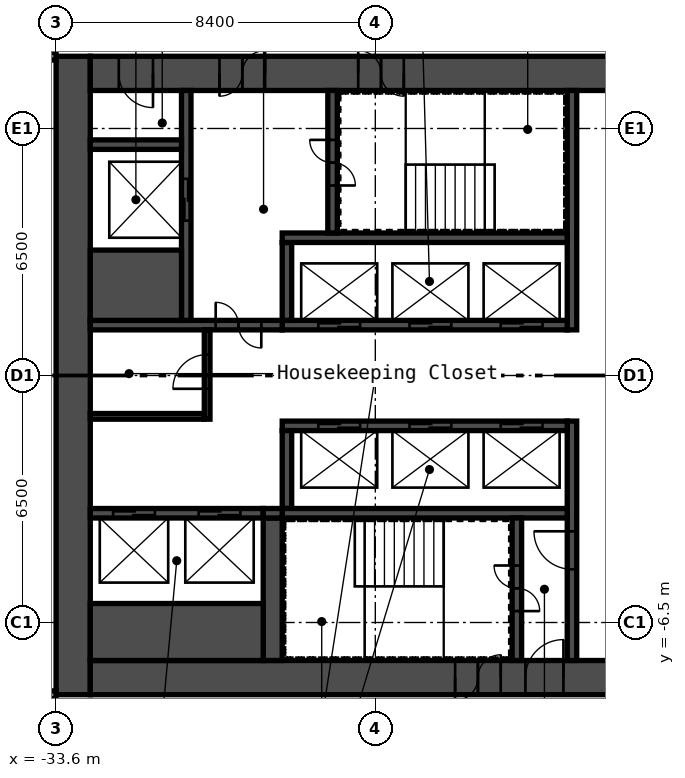
"""IFC4 building model, lengths in metres.
Left out: names, types, materials, properties, quantities, classifications, styles, units other than length and angle.
Written with IfcOpenShell. Run it as: python <this file> out.ifc"""

import sys

from ifc_helpers import new_model, si_unit, direction, frame, frame_2d, origin, place, context, subcontext, project, spatial, rectangle, extrude, element, fill, save


model = new_model("IFC4")
c1 = context("Model", 3, precision=1e-05, world=origin(), true_north=direction((0.0, 1.0)))
c2 = subcontext(c1, "Body", "Model", "MODEL_VIEW")
j1 = project(units=[si_unit("LENGTHUNIT", "METRE"), si_unit("PLANEANGLEUNIT", "RADIAN")], contexts=[c1])
p1 = place(None, origin())
s1 = spatial("IfcSite", under=j1, at=p1, CompositionType="ELEMENT")
p2 = place(p1, origin())
s2 = spatial("IfcBuilding", under=s1, at=p2, CompositionType="ELEMENT")
p3 = place(p2, origin())
s3 = spatial("IfcBuildingStorey", under=s2, at=p3, CompositionType="ELEMENT", Elevation=0.0)
p4 = place(p3, frame((-33.15, -8.4, 0.0), z_axis=(0.0, 0.0, 1.0), x_axis=(0.0, 1.0, 0.0)))
e1 = element("IfcWall", 1, at=p4, inside=s3, PredefinedType="SHEAR", context=c2, shape_type="SweptSolid", body=[
    extrude(rectangle(XDim=16.8, YDim=0.9, at=frame_2d((8.4, 0.0))), origin(), (0.0, 0.0, 1.0), 8.6),
])
p5 = place(p3, frame((-32.7, 7.95, 0.0), z_axis=(0.0, 0.0, 1.0), x_axis=(1.0, 0.0, 0.0)))
e2 = element("IfcWall", 2, at=p5, inside=s3, PredefinedType="SHEAR", context=c2, shape_type="SweptSolid", body=[
    extrude(rectangle(XDim=15.0, YDim=0.9, at=frame_2d((7.5, 0.0))), origin(), (0.0, 0.0, 1.0), 8.6),
])
p6 = place(p5, frame((3.4, 0.0, 0.0)))
e3 = element("IfcOpeningElement", 3, at=p6, cuts=e2, PredefinedType="OPENING", context=c2, shape_type="SweptSolid", body=[
    extrude(rectangle(XDim=1.2, YDim=2.1, at=frame_2d((0.6, 1.05))), frame((0.0, 0.46, 0.0), z_axis=(0.0, -1.0, 0.0), x_axis=(1.0, 0.0, 0.0)), (0.0, 0.0, 1.0), 0.92),
])
p7 = place(p5, frame((0.75, 0.0, 0.0)))
e4 = element("IfcOpeningElement", 4, at=p7, cuts=e2, PredefinedType="OPENING", context=c2, shape_type="SweptSolid", body=[
    extrude(rectangle(XDim=0.9, YDim=2.1, at=frame_2d((0.45, 1.05))), frame((0.0, 0.46, 0.0), z_axis=(0.0, -1.0, 0.0), x_axis=(1.0, 0.0, 0.0)), (0.0, 0.0, 1.0), 0.92),
])
p8 = place(p5, frame((7.05, 0.0, 0.0)))
e5 = element("IfcOpeningElement", 5, at=p8, cuts=e2, PredefinedType="OPENING", context=c2, shape_type="SweptSolid", body=[
    extrude(rectangle(XDim=1.2, YDim=2.1, at=frame_2d((0.6, 1.05))), frame((0.0, 0.46, 0.0), z_axis=(0.0, -1.0, 0.0), x_axis=(1.0, 0.0, 0.0)), (0.0, 0.0, 1.0), 0.92),
])
p9 = place(p3, frame((-32.7, -7.95, 0.0), z_axis=(0.0, 0.0, 1.0), x_axis=(1.0, 0.0, 0.0)))
e6 = element("IfcWall", 6, at=p9, inside=s3, PredefinedType="SHEAR", context=c2, shape_type="SweptSolid", body=[
    extrude(rectangle(XDim=15.0, YDim=0.9, at=frame_2d((7.5, 0.0))), origin(), (0.0, 0.0, 1.0), 8.6),
])
p10 = place(p9, frame((11.45, 0.0, 0.0)))
e7 = element("IfcOpeningElement", 7, at=p10, cuts=e6, PredefinedType="OPENING", context=c2, shape_type="SweptSolid", body=[
    extrude(rectangle(XDim=1.0, YDim=2.1, at=frame_2d((0.5, 1.05))), frame((0.0, 0.46, 0.0), z_axis=(0.0, -1.0, 0.0), x_axis=(1.0, 0.0, 0.0)), (0.0, 0.0, 1.0), 0.92),
])
p11 = place(p9, frame((9.6, 0.0, 0.0)))
e8 = element("IfcOpeningElement", 8, at=p11, cuts=e6, PredefinedType="OPENING", context=c2, shape_type="SweptSolid", body=[
    extrude(rectangle(XDim=1.2, YDim=2.1, at=frame_2d((0.6, 1.05))), frame((0.0, 0.46, 0.0), z_axis=(0.0, -1.0, 0.0), x_axis=(1.0, 0.0, 0.0)), (0.0, 0.0, 1.0), 0.92),
])
p12 = place(p3, frame((-20.025, 1.2, 0.0), z_axis=(0.0, 0.0, 1.0), x_axis=(0.0, 1.0, 0.0)))
e9 = element("IfcWall", 9, at=p12, inside=s3, PredefinedType="SHEAR", context=c2, shape_type="SweptSolid", body=[
    extrude(rectangle(XDim=6.3, YDim=0.25, at=frame_2d((3.15, 0.0))), origin(), (0.0, 0.0, 1.0), 8.6),
])
p13 = place(p3, frame((-20.025, -7.5, 0.0), z_axis=(0.0, 0.0, 1.0), x_axis=(0.0, 1.0, 0.0)))
e10 = element("IfcWall", 10, at=p13, inside=s3, PredefinedType="SHEAR", context=c2, shape_type="SweptSolid", body=[
    extrude(rectangle(XDim=6.3, YDim=0.25, at=frame_2d((3.15, 0.0))), origin(), (0.0, 0.0, 1.0), 8.6),
])
p14 = place(p13, frame((2.4, 0.0, 0.0)))
e11 = element("IfcOpeningElement", 11, at=p14, cuts=e10, PredefinedType="OPENING", context=c2, shape_type="SweptSolid", body=[
    extrude(rectangle(XDim=1.0, YDim=2.1, at=frame_2d((0.5, 1.05))), frame((0.0, 0.135, 0.0), z_axis=(0.0, -1.0, 0.0), x_axis=(1.0, 0.0, 0.0)), (0.0, 0.0, 1.0), 0.27),
])
p15 = place(p3, frame((-27.65, 1.325, 0.0), z_axis=(0.0, 0.0, 1.0), x_axis=(1.0, 0.0, 0.0)))
e12 = element("IfcWall", 12, at=p15, inside=s3, PredefinedType="SHEAR", context=c2, shape_type="SweptSolid", body=[
    extrude(rectangle(XDim=7.5, YDim=0.25, at=frame_2d((3.75, 0.0))), origin(), (0.0, 0.0, 1.0), 8.6),
])
p16 = place(p15, frame((5.75, 0.0, 0.0)))
e13 = element("IfcOpeningElement", 13, at=p16, cuts=e12, PredefinedType="OPENING", context=c2, shape_type="SweptSolid", body=[
    extrude(rectangle(XDim=1.1, YDim=2.1, at=frame_2d((0.55, 1.05))), frame((0.0, 0.135, 0.0), z_axis=(0.0, -1.0, 0.0), x_axis=(1.0, 0.0, 0.0)), (0.0, 0.0, 1.0), 0.27),
])
p17 = place(p15, frame((3.35, 0.0, 0.0)))
e14 = element("IfcOpeningElement", 14, at=p17, cuts=e12, PredefinedType="OPENING", context=c2, shape_type="SweptSolid", body=[
    extrude(rectangle(XDim=1.1, YDim=2.1, at=frame_2d((0.55, 1.05))), frame((0.0, 0.135, 0.0), z_axis=(0.0, -1.0, 0.0), x_axis=(1.0, 0.0, 0.0)), (0.0, 0.0, 1.0), 0.27),
])
p18 = place(p15, frame((0.95, 0.0, 0.0)))
e15 = element("IfcOpeningElement", 15, at=p18, cuts=e12, PredefinedType="OPENING", context=c2, shape_type="SweptSolid", body=[
    extrude(rectangle(XDim=1.1, YDim=2.1, at=frame_2d((0.55, 1.05))), frame((0.0, 0.135, 0.0), z_axis=(0.0, -1.0, 0.0), x_axis=(1.0, 0.0, 0.0)), (0.0, 0.0, 1.0), 0.27),
])
p19 = place(p3, frame((-27.525, 1.45, 0.0), z_axis=(0.0, 0.0, 1.0), x_axis=(0.0, 1.0, 0.0)))
e16 = element("IfcWall", 16, at=p19, inside=s3, PredefinedType="SHEAR", context=c2, shape_type="SweptSolid", body=[
    extrude(rectangle(XDim=2.05, YDim=0.25, at=frame_2d((1.025, 0.0))), origin(), (0.0, 0.0, 1.0), 8.6),
])
p20 = place(p3, frame((-27.65, 3.625, 0.0), z_axis=(0.0, 0.0, 1.0), x_axis=(1.0, 0.0, 0.0)))
e17 = element("IfcWall", 17, at=p20, inside=s3, PredefinedType="SHEAR", context=c2, shape_type="SweptSolid", body=[
    extrude(rectangle(XDim=7.5, YDim=0.25, at=frame_2d((3.75, 0.0))), origin(), (0.0, 0.0, 1.0), 8.6),
])
p21 = place(p3, frame((-26.325, 3.75, 0.0), z_axis=(0.0, 0.0, 1.0), x_axis=(0.0, 1.0, 0.0)))
e18 = element("IfcWall", 18, at=p21, inside=s3, PredefinedType="SHEAR", context=c2, shape_type="SweptSolid", body=[
    extrude(rectangle(XDim=3.75, YDim=0.25, at=frame_2d((1.875, 0.0))), origin(), (0.0, 0.0, 1.0), 8.6),
])
p22 = place(p21, frame((1.25, 0.0, 0.0)))
e19 = element("IfcOpeningElement", 19, at=p22, cuts=e18, PredefinedType="OPENING", context=c2, shape_type="SweptSolid", body=[
    extrude(rectangle(XDim=1.2, YDim=2.1, at=frame_2d((0.6, 1.05))), frame((0.0, 0.135, 0.0), z_axis=(0.0, -1.0, 0.0), x_axis=(1.0, 0.0, 0.0)), (0.0, 0.0, 1.0), 0.27),
])
p23 = place(p3, frame((-32.7, 1.325, 0.0), z_axis=(0.0, 0.0, 1.0), x_axis=(1.0, 0.0, 0.0)))
e20 = element("IfcWall", 20, at=p23, inside=s3, PredefinedType="SHEAR", context=c2, shape_type="SweptSolid", body=[
    extrude(rectangle(XDim=5.05, YDim=0.25, at=frame_2d((2.525, 0.0))), origin(), (0.0, 0.0, 1.0), 8.6),
])
p24 = place(p23, frame((3.3, 0.0, 0.0)))
e21 = element("IfcOpeningElement", 21, at=p24, cuts=e20, PredefinedType="OPENING", context=c2, shape_type="SweptSolid", body=[
    extrude(rectangle(XDim=1.2, YDim=2.1, at=frame_2d((0.6, 1.05))), frame((0.0, 0.135, 0.0), z_axis=(0.0, -1.0, 0.0), x_axis=(1.0, 0.0, 0.0)), (0.0, 0.0, 1.0), 0.27),
])
p25 = place(p3, frame((-30.175, 1.45, 0.0), z_axis=(0.0, 0.0, 1.0), x_axis=(0.0, 1.0, 0.0)))
e22 = element("IfcWall", 22, at=p25, inside=s3, PredefinedType="SHEAR", context=c2, shape_type="SweptSolid", body=[
    extrude(rectangle(XDim=6.05, YDim=0.25, at=frame_2d((3.025, 0.0))), origin(), (0.0, 0.0, 1.0), 8.6),
])
p26 = place(p25, frame((2.625, 0.0, 0.0)))
e23 = element("IfcOpeningElement", 23, at=p26, cuts=e22, PredefinedType="OPENING", context=c2, shape_type="SweptSolid", body=[
    extrude(rectangle(XDim=1.1, YDim=2.1, at=frame_2d((0.55, 1.05))), frame((0.0, 0.135, 0.0), z_axis=(0.0, -1.0, 0.0), x_axis=(1.0, 0.0, 0.0)), (0.0, 0.0, 1.0), 0.27),
])
p27 = place(p3, frame((-32.7, 2.375, 0.0), z_axis=(0.0, 0.0, 1.0), x_axis=(1.0, 0.0, 0.0)))
e24 = element("IfcWall", 24, at=p27, inside=s3, PredefinedType="SHEAR", context=c2, shape_type="SweptSolid", body=[
    extrude(rectangle(XDim=2.4, YDim=1.85, at=frame_2d((1.2, 0.0))), origin(), (0.0, 0.0, 1.0), 8.6),
])
p28 = place(p3, frame((-32.7, 6.075, 0.0), z_axis=(0.0, 0.0, 1.0), x_axis=(1.0, 0.0, 0.0)))
e25 = element("IfcWall", 25, at=p28, inside=s3, PredefinedType="SHEAR", context=c2, shape_type="SweptSolid", body=[
    extrude(rectangle(XDim=2.4, YDim=0.25, at=frame_2d((1.2, 0.0))), origin(), (0.0, 0.0, 1.0), 8.6),
])
p29 = place(p3, frame((-27.65, -1.325, 0.0), z_axis=(0.0, 0.0, 1.0), x_axis=(1.0, 0.0, 0.0)))
e26 = element("IfcWall", 26, at=p29, inside=s3, PredefinedType="SHEAR", context=c2, shape_type="SweptSolid", body=[
    extrude(rectangle(XDim=7.5, YDim=0.25, at=frame_2d((3.75, 0.0))), origin(), (0.0, 0.0, 1.0), 8.6),
])
p30 = place(p29, frame((5.75, 0.0, 0.0)))
e27 = element("IfcOpeningElement", 27, at=p30, cuts=e26, PredefinedType="OPENING", context=c2, shape_type="SweptSolid", body=[
    extrude(rectangle(XDim=1.1, YDim=2.1, at=frame_2d((0.55, 1.05))), frame((0.0, 0.135, 0.0), z_axis=(0.0, -1.0, 0.0), x_axis=(1.0, 0.0, 0.0)), (0.0, 0.0, 1.0), 0.27),
])
p31 = place(p29, frame((3.35, 0.0, 0.0)))
e28 = element("IfcOpeningElement", 28, at=p31, cuts=e26, PredefinedType="OPENING", context=c2, shape_type="SweptSolid", body=[
    extrude(rectangle(XDim=1.1, YDim=2.1, at=frame_2d((0.55, 1.05))), frame((0.0, 0.135, 0.0), z_axis=(0.0, -1.0, 0.0), x_axis=(1.0, 0.0, 0.0)), (0.0, 0.0, 1.0), 0.27),
])
p32 = place(p29, frame((0.95, 0.0, 0.0)))
e29 = element("IfcOpeningElement", 29, at=p32, cuts=e26, PredefinedType="OPENING", context=c2, shape_type="SweptSolid", body=[
    extrude(rectangle(XDim=1.1, YDim=2.1, at=frame_2d((0.55, 1.05))), frame((0.0, 0.135, 0.0), z_axis=(0.0, -1.0, 0.0), x_axis=(1.0, 0.0, 0.0)), (0.0, 0.0, 1.0), 0.27),
])
p33 = place(p3, frame((-27.525, -3.5, 0.0), z_axis=(0.0, 0.0, 1.0), x_axis=(0.0, 1.0, 0.0)))
e30 = element("IfcWall", 30, at=p33, inside=s3, PredefinedType="SHEAR", context=c2, shape_type="SweptSolid", body=[
    extrude(rectangle(XDim=2.05, YDim=0.25, at=frame_2d((1.025, 0.0))), origin(), (0.0, 0.0, 1.0), 8.6),
])
p34 = place(p3, frame((-27.65, -3.625, 0.0), z_axis=(0.0, 0.0, 1.0), x_axis=(1.0, 0.0, 0.0)))
e31 = element("IfcWall", 31, at=p34, inside=s3, PredefinedType="SHEAR", context=c2, shape_type="SweptSolid", body=[
    extrude(rectangle(XDim=7.5, YDim=0.25, at=frame_2d((3.75, 0.0))), origin(), (0.0, 0.0, 1.0), 8.6),
])
p35 = place(p3, frame((-21.475, -7.5, 0.0), z_axis=(0.0, 0.0, 1.0), x_axis=(0.0, 1.0, 0.0)))
e32 = element("IfcWall", 32, at=p35, inside=s3, PredefinedType="SHEAR", context=c2, shape_type="SweptSolid", body=[
    extrude(rectangle(XDim=3.75, YDim=0.25, at=frame_2d((1.875, 0.0))), origin(), (0.0, 0.0, 1.0), 8.6),
])
p36 = place(p35, frame((1.3, 0.0, 0.0)))
e33 = element("IfcOpeningElement", 33, at=p36, cuts=e32, PredefinedType="OPENING", context=c2, shape_type="SweptSolid", body=[
    extrude(rectangle(XDim=1.2, YDim=2.1, at=frame_2d((0.6, 1.05))), frame((0.0, 0.135, 0.0), z_axis=(0.0, -1.0, 0.0), x_axis=(1.0, 0.0, 0.0)), (0.0, 0.0, 1.0), 0.27),
])
p37 = place(p3, frame((-27.9, -7.5, 0.0), z_axis=(0.0, 0.0, 1.0), x_axis=(0.0, 1.0, 0.0)))
e34 = element("IfcWall", 34, at=p37, inside=s3, PredefinedType="SHEAR", context=c2, shape_type="SweptSolid", body=[
    extrude(rectangle(XDim=3.75, YDim=0.5, at=frame_2d((1.875, 0.0))), origin(), (0.0, 0.0, 1.0), 8.6),
])
p38 = place(p3, frame((-32.7, -3.625, 0.0), z_axis=(0.0, 0.0, 1.0), x_axis=(1.0, 0.0, 0.0)))
e35 = element("IfcWall", 35, at=p38, inside=s3, PredefinedType="SHEAR", context=c2, shape_type="SweptSolid", body=[
    extrude(rectangle(XDim=4.55, YDim=0.25, at=frame_2d((2.275, 0.0))), origin(), (0.0, 0.0, 1.0), 8.6),
])
p39 = place(p38, frame((2.85, 0.0, 0.0)))
e36 = element("IfcOpeningElement", 36, at=p39, cuts=e35, PredefinedType="OPENING", context=c2, shape_type="SweptSolid", body=[
    extrude(rectangle(XDim=1.1, YDim=2.1, at=frame_2d((0.55, 1.05))), frame((0.0, 0.135, 0.0), z_axis=(0.0, -1.0, 0.0), x_axis=(1.0, 0.0, 0.0)), (0.0, 0.0, 1.0), 0.27),
])
p40 = place(p38, frame((0.6, 0.0, 0.0)))
e37 = element("IfcOpeningElement", 37, at=p40, cuts=e35, PredefinedType="OPENING", context=c2, shape_type="SweptSolid", body=[
    extrude(rectangle(XDim=1.1, YDim=2.1, at=frame_2d((0.55, 1.05))), frame((0.0, 0.135, 0.0), z_axis=(0.0, -1.0, 0.0), x_axis=(1.0, 0.0, 0.0)), (0.0, 0.0, 1.0), 0.27),
])
p41 = place(p3, frame((-32.7, -6.75, 0.0), z_axis=(0.0, 0.0, 1.0), x_axis=(1.0, 0.0, 0.0)))
e38 = element("IfcWall", 38, at=p41, inside=s3, PredefinedType="SHEAR", context=c2, shape_type="SweptSolid", body=[
    extrude(rectangle(XDim=4.55, YDim=1.5, at=frame_2d((2.275, 0.0))), origin(), (0.0, 0.0, 1.0), 8.6),
])
p42 = place(p3, frame((-28.15, -3.625, 0.0), z_axis=(0.0, 0.0, 1.0), x_axis=(1.0, 0.0, 0.0)))
e39 = element("IfcWall", 39, at=p42, inside=s3, PredefinedType="SHEAR", context=c2, shape_type="SweptSolid", body=[
    extrude(rectangle(XDim=0.5, YDim=0.25, at=frame_2d((0.25, 0.0))), origin(), (0.0, 0.0, 1.0), 8.6),
])
p43 = place(p3, frame((-29.625, -1.15, 0.0), z_axis=(0.0, 0.0, 1.0), x_axis=(0.0, 1.0, 0.0)))
e40 = element("IfcWall", 40, at=p43, inside=s3, PredefinedType="PARTITIONING", context=c2, shape_type="SweptSolid", body=[
    extrude(rectangle(XDim=2.35, YDim=0.15, at=frame_2d((1.175, 0.0))), origin(), (0.0, 0.0, 1.0), 8.6),
])
p44 = place(p43, frame((0.8, 0.0, 0.0)))
e41 = element("IfcOpeningElement", 41, at=p44, cuts=e40, PredefinedType="OPENING", context=c2, shape_type="SweptSolid", body=[
    extrude(rectangle(XDim=0.9, YDim=2.1, at=frame_2d((0.45, 1.05))), frame((0.0, 0.085, 0.0), z_axis=(0.0, -1.0, 0.0), x_axis=(1.0, 0.0, 0.0)), (0.0, 0.0, 1.0), 0.17),
])
p45 = place(p3, frame((-32.7, -1.075, 0.0), z_axis=(0.0, 0.0, 1.0), x_axis=(1.0, 0.0, 0.0)))
e42 = element("IfcWall", 42, at=p45, inside=s3, PredefinedType="PARTITIONING", context=c2, shape_type="SweptSolid", body=[
    extrude(rectangle(XDim=3.0, YDim=0.15, at=frame_2d((1.5, 0.0))), origin(), (0.0, 0.0, 1.0), 8.6),
])
for number, where, z_axis, x_axis in (
    (43, (-39.0, -8.4, 0.0), (0.0, 0.0, 1.0), (1.0, 0.0, 0.0)),
    (44, (-33.6, 8.4, 0.0), (0.0, 0.0, 1.0), (-1.0, 0.0, 0.0)),
):
    element("IfcWall", number, at=place(p3, frame(where, z_axis=z_axis, x_axis=x_axis)), inside=s3, PredefinedType="PARTITIONING", context=c2, shape_type="SweptSolid", body=[
        extrude(rectangle(XDim=5.4, YDim=0.2, at=frame_2d((2.7, 0.0))), origin(), (0.0, 0.0, 1.0), 8.6),
    ])
p46 = place(p6, origin())
e45 = element("IfcDoor", 45, at=p46, inside=s3, OperationType="DOUBLE_DOOR_SINGLE_SWING", PredefinedType="DOOR", context=c2, shape_type="SweptSolid", body=[
    extrude(rectangle(XDim=1.2, YDim=2.1, at=frame_2d((0.6, 1.05))), frame((0.0, 0.025, 0.0), z_axis=(0.0, -1.0, 0.0), x_axis=(1.0, 0.0, 0.0)), (0.0, 0.0, 1.0), 0.05),
])
fill(e3, e45)
p47 = place(p7, origin())
e46 = element("IfcDoor", 46, at=p47, inside=s3, OperationType="SINGLE_SWING_RIGHT", PredefinedType="DOOR", context=c2, shape_type="SweptSolid", body=[
    extrude(rectangle(XDim=0.9, YDim=2.1, at=frame_2d((0.45, 1.05))), frame((0.0, 0.025, 0.0), z_axis=(0.0, -1.0, 0.0), x_axis=(1.0, 0.0, 0.0)), (0.0, 0.0, 1.0), 0.05),
])
fill(e4, e46)
p48 = place(p10, origin())
e47 = element("IfcDoor", 47, at=p48, inside=s3, OperationType="SINGLE_SWING_LEFT", PredefinedType="DOOR", context=c2, shape_type="SweptSolid", body=[
    extrude(rectangle(XDim=1.0, YDim=2.1, at=frame_2d((0.5, 1.05))), frame((0.0, 0.025, 0.0), z_axis=(0.0, -1.0, 0.0), x_axis=(1.0, 0.0, 0.0)), (0.0, 0.0, 1.0), 0.05),
])
fill(e7, e47)
p49 = place(p8, origin())
e48 = element("IfcDoor", 48, at=p49, inside=s3, OperationType="DOUBLE_DOOR_SINGLE_SWING", PredefinedType="DOOR", context=c2, shape_type="SweptSolid", body=[
    extrude(rectangle(XDim=1.2, YDim=2.1, at=frame_2d((0.6, 1.05))), frame((0.0, 0.025, 0.0), z_axis=(0.0, -1.0, 0.0), x_axis=(1.0, 0.0, 0.0)), (0.0, 0.0, 1.0), 0.05),
])
fill(e5, e48)
p50 = place(p11, frame((1.2, 0.0, 0.0), z_axis=(0.0, 0.0, 1.0), x_axis=(-1.0, 0.0, 0.0)))
e49 = element("IfcDoor", 49, at=p50, inside=s3, OperationType="DOUBLE_DOOR_SINGLE_SWING", PredefinedType="DOOR", context=c2, shape_type="SweptSolid", body=[
    extrude(rectangle(XDim=1.2, YDim=2.1, at=frame_2d((0.6, 1.05))), frame((0.0, 0.025, 0.0), z_axis=(0.0, -1.0, 0.0), x_axis=(1.0, 0.0, 0.0)), (0.0, 0.0, 1.0), 0.05),
])
fill(e8, e49)
p51 = place(p22, origin())
e50 = element("IfcDoor", 50, at=p51, inside=s3, OperationType="DOUBLE_DOOR_SINGLE_SWING", PredefinedType="DOOR", context=c2, shape_type="SweptSolid", body=[
    extrude(rectangle(XDim=1.2, YDim=2.1, at=frame_2d((0.6, 1.05))), frame((0.0, 0.025, 0.0), z_axis=(0.0, -1.0, 0.0), x_axis=(1.0, 0.0, 0.0)), (0.0, 0.0, 1.0), 0.05),
])
fill(e19, e50)
p52 = place(p36, origin())
e51 = element("IfcDoor", 51, at=p52, inside=s3, OperationType="DOUBLE_DOOR_SINGLE_SWING", PredefinedType="DOOR", context=c2, shape_type="SweptSolid", body=[
    extrude(rectangle(XDim=1.2, YDim=2.1, at=frame_2d((0.6, 1.05))), frame((0.0, 0.025, 0.0), z_axis=(0.0, -1.0, 0.0), x_axis=(1.0, 0.0, 0.0)), (0.0, 0.0, 1.0), 0.05),
])
fill(e33, e51)
p53 = place(p14, origin())
e52 = element("IfcDoor", 52, at=p53, inside=s3, OperationType="SINGLE_SWING_LEFT", PredefinedType="DOOR", context=c2, shape_type="SweptSolid", body=[
    extrude(rectangle(XDim=1.0, YDim=2.1, at=frame_2d((0.5, 1.05))), frame((0.0, 0.025, 0.0), z_axis=(0.0, -1.0, 0.0), x_axis=(1.0, 0.0, 0.0)), (0.0, 0.0, 1.0), 0.05),
])
fill(e11, e52)
p54 = place(p24, origin())
e53 = element("IfcDoor", 53, at=p54, inside=s3, OperationType="DOUBLE_DOOR_SINGLE_SWING", PredefinedType="DOOR", context=c2, shape_type="SweptSolid", body=[
    extrude(rectangle(XDim=1.2, YDim=2.1, at=frame_2d((0.6, 1.05))), frame((0.0, 0.025, 0.0), z_axis=(0.0, -1.0, 0.0), x_axis=(1.0, 0.0, 0.0)), (0.0, 0.0, 1.0), 0.05),
])
fill(e21, e53)
p55 = place(p44, origin())
e54 = element("IfcDoor", 54, at=p55, inside=s3, OperationType="SINGLE_SWING_RIGHT", PredefinedType="DOOR", context=c2, shape_type="SweptSolid", body=[
    extrude(rectangle(XDim=0.9, YDim=2.1, at=frame_2d((0.45, 1.05))), frame((0.0, 0.025, 0.0), z_axis=(0.0, -1.0, 0.0), x_axis=(1.0, 0.0, 0.0)), (0.0, 0.0, 1.0), 0.05),
])
fill(e41, e54)
p56 = place(p16, origin())
e55 = element("IfcDoor", 55, at=p56, inside=s3, OperationType="DOUBLE_DOOR_SLIDING", PredefinedType="DOOR", context=c2, shape_type="SweptSolid", body=[
    extrude(rectangle(XDim=1.1, YDim=2.1, at=frame_2d((0.55, 1.05))), frame((0.0, 0.025, 0.0), z_axis=(0.0, -1.0, 0.0), x_axis=(1.0, 0.0, 0.0)), (0.0, 0.0, 1.0), 0.05),
])
fill(e13, e55)
p57 = place(p17, origin())
e56 = element("IfcDoor", 56, at=p57, inside=s3, OperationType="DOUBLE_DOOR_SLIDING", PredefinedType="DOOR", context=c2, shape_type="SweptSolid", body=[
    extrude(rectangle(XDim=1.1, YDim=2.1, at=frame_2d((0.55, 1.05))), frame((0.0, 0.025, 0.0), z_axis=(0.0, -1.0, 0.0), x_axis=(1.0, 0.0, 0.0)), (0.0, 0.0, 1.0), 0.05),
])
fill(e14, e56)
p58 = place(p18, origin())
e57 = element("IfcDoor", 57, at=p58, inside=s3, OperationType="DOUBLE_DOOR_SLIDING", PredefinedType="DOOR", context=c2, shape_type="SweptSolid", body=[
    extrude(rectangle(XDim=1.1, YDim=2.1, at=frame_2d((0.55, 1.05))), frame((0.0, 0.025, 0.0), z_axis=(0.0, -1.0, 0.0), x_axis=(1.0, 0.0, 0.0)), (0.0, 0.0, 1.0), 0.05),
])
fill(e15, e57)
p59 = place(p30, origin())
e58 = element("IfcDoor", 58, at=p59, inside=s3, OperationType="DOUBLE_DOOR_SLIDING", PredefinedType="DOOR", context=c2, shape_type="SweptSolid", body=[
    extrude(rectangle(XDim=1.1, YDim=2.1, at=frame_2d((0.55, 1.05))), frame((0.0, 0.025, 0.0), z_axis=(0.0, -1.0, 0.0), x_axis=(1.0, 0.0, 0.0)), (0.0, 0.0, 1.0), 0.05),
])
fill(e27, e58)
p60 = place(p31, origin())
e59 = element("IfcDoor", 59, at=p60, inside=s3, OperationType="DOUBLE_DOOR_SLIDING", PredefinedType="DOOR", context=c2, shape_type="SweptSolid", body=[
    extrude(rectangle(XDim=1.1, YDim=2.1, at=frame_2d((0.55, 1.05))), frame((0.0, 0.025, 0.0), z_axis=(0.0, -1.0, 0.0), x_axis=(1.0, 0.0, 0.0)), (0.0, 0.0, 1.0), 0.05),
])
fill(e28, e59)
p61 = place(p32, origin())
e60 = element("IfcDoor", 60, at=p61, inside=s3, OperationType="DOUBLE_DOOR_SLIDING", PredefinedType="DOOR", context=c2, shape_type="SweptSolid", body=[
    extrude(rectangle(XDim=1.1, YDim=2.1, at=frame_2d((0.55, 1.05))), frame((0.0, 0.025, 0.0), z_axis=(0.0, -1.0, 0.0), x_axis=(1.0, 0.0, 0.0)), (0.0, 0.0, 1.0), 0.05),
])
fill(e29, e60)
p62 = place(p26, origin())
e61 = element("IfcDoor", 61, at=p62, inside=s3, OperationType="DOUBLE_DOOR_SLIDING", PredefinedType="DOOR", context=c2, shape_type="SweptSolid", body=[
    extrude(rectangle(XDim=1.1, YDim=2.1, at=frame_2d((0.55, 1.05))), frame((0.0, 0.025, 0.0), z_axis=(0.0, -1.0, 0.0), x_axis=(1.0, 0.0, 0.0)), (0.0, 0.0, 1.0), 0.05),
])
fill(e23, e61)
p63 = place(p39, origin())
e62 = element("IfcDoor", 62, at=p63, inside=s3, OperationType="DOUBLE_DOOR_SLIDING", PredefinedType="DOOR", context=c2, shape_type="SweptSolid", body=[
    extrude(rectangle(XDim=1.1, YDim=2.1, at=frame_2d((0.55, 1.05))), frame((0.0, 0.025, 0.0), z_axis=(0.0, -1.0, 0.0), x_axis=(1.0, 0.0, 0.0)), (0.0, 0.0, 1.0), 0.05),
])
fill(e36, e62)
p64 = place(p40, origin())
e63 = element("IfcDoor", 63, at=p64, inside=s3, OperationType="DOUBLE_DOOR_SLIDING", PredefinedType="DOOR", context=c2, shape_type="SweptSolid", body=[
    extrude(rectangle(XDim=1.1, YDim=2.1, at=frame_2d((0.55, 1.05))), frame((0.0, 0.025, 0.0), z_axis=(0.0, -1.0, 0.0), x_axis=(1.0, 0.0, 0.0)), (0.0, 0.0, 1.0), 0.05),
])
fill(e37, e63)
save(model, sys.argv[1])
